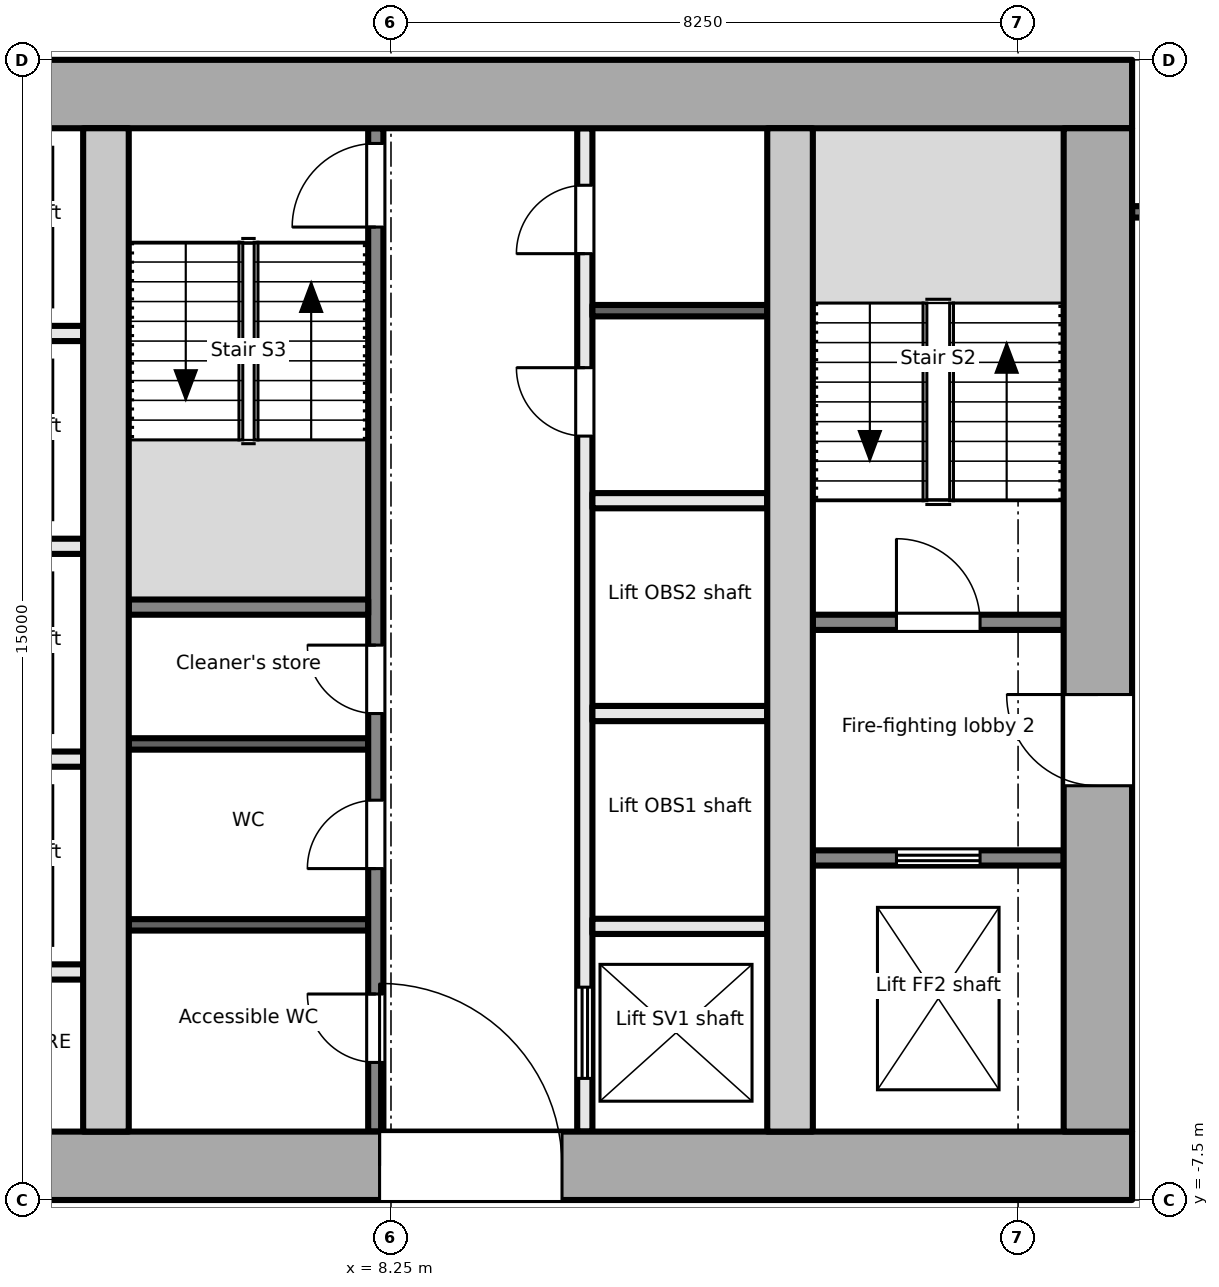
"""IFC4 building model, lengths in metres.
Left out: names, types, materials, properties, quantities, classifications, styles, units other than length and angle.
Written with IfcOpenShell. Run it as: python <this file> out.ifc"""

import sys

from ifc_helpers import new_model, si_unit, direction, frame, frame_2d, origin, place, context, subcontext, project, spatial, rectangle, extrude, element, fill, save


model = new_model("IFC4")
c1 = context("Model", 3, precision=1e-05, world=origin(), true_north=direction((0.0, 1.0)))
c2 = subcontext(c1, "Body", "Model", "MODEL_VIEW")
j1 = project(units=[si_unit("LENGTHUNIT", "METRE"), si_unit("PLANEANGLEUNIT", "RADIAN")], contexts=[c1])
p1 = place(None, origin())
s1 = spatial("IfcSite", under=j1, at=p1, CompositionType="ELEMENT")
p2 = place(p1, origin())
s2 = spatial("IfcBuilding", under=s1, at=p2, CompositionType="ELEMENT")
p3 = place(p2, frame((0.0, 0.0, 282.4)))
s3 = spatial("IfcBuildingStorey", under=s2, at=p3, CompositionType="ELEMENT", Elevation=282.4)
p4 = place(p3, frame((-18.0, -7.05, -0.2), z_axis=(0.0, 0.0, 1.0), x_axis=(1.0, 0.0, 0.0)))
e1 = element("IfcWall", 1, at=p4, inside=s3, PredefinedType="SHEAR", context=c2, shape_type="SweptSolid", body=[
    extrude(rectangle(XDim=36.0, YDim=0.9, at=frame_2d((18.0, 0.0))), origin(), (0.0, 0.0, 1.0), 3.9),
])
p5 = place(p4, frame((8.1, 0.0, 0.2)))
e2 = element("IfcOpeningElement", 2, at=p5, cuts=e1, PredefinedType="OPENING", context=c2, shape_type="SweptSolid", body=[
    extrude(rectangle(XDim=1.8, YDim=2.1, at=frame_2d((0.9, 1.05))), frame((0.0, 0.46, 0.0), z_axis=(0.0, -1.0, 0.0), x_axis=(1.0, 0.0, 0.0)), (0.0, 0.0, 1.0), 0.921),
])
p6 = place(p4, frame((16.8, 0.0, 0.2)))
e3 = element("IfcOpeningElement", 3, at=p6, cuts=e1, PredefinedType="OPENING", context=c2, shape_type="SweptSolid", body=[
    extrude(rectangle(XDim=2.4, YDim=2.1, at=frame_2d((1.2, 1.05))), frame((0.0, 0.46, 0.0), z_axis=(0.0, -1.0, 0.0), x_axis=(1.0, 0.0, 0.0)), (0.0, 0.0, 1.0), 0.921),
])
p7 = place(p4, frame((26.1, 0.0, 0.2)))
e4 = element("IfcOpeningElement", 4, at=p7, cuts=e1, PredefinedType="OPENING", context=c2, shape_type="SweptSolid", body=[
    extrude(rectangle(XDim=2.4, YDim=2.1, at=frame_2d((1.2, 1.05))), frame((0.0, 0.46, 0.0), z_axis=(0.0, -1.0, 0.0), x_axis=(1.0, 0.0, 0.0)), (0.0, 0.0, 1.0), 0.921),
])
p8 = place(p3, frame((-18.0, 7.05, -0.2), z_axis=(0.0, 0.0, 1.0), x_axis=(1.0, 0.0, 0.0)))
e5 = element("IfcWall", 5, at=p8, inside=s3, PredefinedType="SHEAR", context=c2, shape_type="SweptSolid", body=[
    extrude(rectangle(XDim=36.0, YDim=0.9, at=frame_2d((18.0, 0.0))), origin(), (0.0, 0.0, 1.0), 3.9),
])
p9 = place(p3, frame((17.55, -6.6, -0.2), z_axis=(0.0, 0.0, 1.0), x_axis=(0.0, 1.0, 0.0)))
e6 = element("IfcWall", 6, at=p9, inside=s3, PredefinedType="SHEAR", context=c2, shape_type="SweptSolid", body=[
    extrude(rectangle(XDim=13.2, YDim=0.9, at=frame_2d((6.6, 0.0))), origin(), (0.0, 0.0, 1.0), 3.9),
])
p10 = place(p9, frame((4.55, 0.0, 0.2)))
e7 = element("IfcOpeningElement", 7, at=p10, cuts=e6, PredefinedType="OPENING", context=c2, shape_type="SweptSolid", body=[
    extrude(rectangle(XDim=1.2, YDim=2.1, at=frame_2d((0.6, 1.05))), frame((0.0, 0.46, 0.0), z_axis=(0.0, -1.0, 0.0), x_axis=(1.0, 0.0, 0.0)), (0.0, 0.0, 1.0), 0.921),
])
for number, where, z_axis, x_axis in (
    (8, (4.5, -6.6, -0.2), (0.0, 0.0, 1.0), (0.0, 1.0, 0.0)),
    (9, (13.5, -6.6, -0.2), (0.0, 0.0, 1.0), (0.0, 1.0, 0.0)),
):
    element("IfcWall", number, at=place(p3, frame(where, z_axis=z_axis, x_axis=x_axis)), inside=s3, PredefinedType="SHEAR", context=c2, shape_type="SweptSolid", body=[
        extrude(rectangle(XDim=13.2, YDim=0.6, at=frame_2d((6.6, 0.0))), origin(), (0.0, 0.0, 1.0), 3.9),
    ])
p11 = place(p3, frame((13.8, -3.0, 0.0), z_axis=(0.0, 0.0, 1.0), x_axis=(1.0, 0.0, 0.0)))
e10 = element("IfcWall", 10, at=p11, inside=s3, PredefinedType="PARTITIONING", context=c2, shape_type="SweptSolid", body=[
    extrude(rectangle(XDim=3.3, YDim=0.2, at=frame_2d((1.65, 0.0))), origin(), (0.0, 0.0, 1.0), 3.7),
])
p12 = place(p11, frame((1.1, 0.0, 0.0)))
e11 = element("IfcOpeningElement", 11, at=p12, cuts=e10, PredefinedType="OPENING", context=c2, shape_type="SweptSolid", body=[
    extrude(rectangle(XDim=1.1, YDim=2.1, at=frame_2d((0.55, 1.05))), frame((0.0, 0.111, 0.0), z_axis=(0.0, -1.0, 0.0), x_axis=(1.0, 0.0, 0.0)), (0.0, 0.0, 1.0), 0.221),
])
p13 = place(p3, frame((13.8, 0.1, 0.0), z_axis=(0.0, 0.0, 1.0), x_axis=(1.0, 0.0, 0.0)))
e12 = element("IfcWall", 12, at=p13, inside=s3, PredefinedType="PARTITIONING", context=c2, shape_type="SweptSolid", body=[
    extrude(rectangle(XDim=3.3, YDim=0.2, at=frame_2d((1.65, 0.0))), origin(), (0.0, 0.0, 1.0), 3.7),
])
p14 = place(p13, frame((1.1, 0.0, 0.0)))
e13 = element("IfcOpeningElement", 13, at=p14, cuts=e12, PredefinedType="OPENING", context=c2, shape_type="SweptSolid", body=[
    extrude(rectangle(XDim=1.1, YDim=2.1, at=frame_2d((0.55, 1.05))), frame((0.0, 0.111, 0.0), z_axis=(0.0, -1.0, 0.0), x_axis=(1.0, 0.0, 0.0)), (0.0, 0.0, 1.0), 0.221),
])
for number, where, z_axis, x_axis in (
    (14, (1.9, -1.7, 0.0), (0.0, 0.0, 1.0), (1.0, 0.0, 0.0)),
    (15, (1.9, 1.1, 0.0), (0.0, 0.0, 1.0), (1.0, 0.0, 0.0)),
    (16, (1.9, 3.9, 0.0), (0.0, 0.0, 1.0), (1.0, 0.0, 0.0)),
    (17, (1.9, -4.5, 0.0), (0.0, 0.0, 1.0), (1.0, 0.0, 0.0)),
):
    element("IfcWall", number, at=place(p3, frame(where, z_axis=z_axis, x_axis=x_axis)), inside=s3, PredefinedType="PARTITIONING", context=c2, shape_type="SweptSolid", body=[
        extrude(rectangle(XDim=2.3, YDim=0.2, at=frame_2d((1.15, 0.0))), origin(), (0.0, 0.0, 1.0), 3.7),
    ])
p15 = place(p3, frame((8.05, -6.6, 0.0), z_axis=(0.0, 0.0, 1.0), x_axis=(0.0, 1.0, 0.0)))
e18 = element("IfcWall", 18, at=p15, inside=s3, PredefinedType="PARTITIONING", context=c2, shape_type="SweptSolid", body=[
    extrude(rectangle(XDim=13.2, YDim=0.2, at=frame_2d((6.6, 0.0))), origin(), (0.0, 0.0, 1.0), 3.7),
])
p16 = place(p15, frame((0.91, 0.0, 0.0)))
e19 = element("IfcOpeningElement", 19, at=p16, cuts=e18, PredefinedType="OPENING", context=c2, shape_type="SweptSolid", body=[
    extrude(rectangle(XDim=0.9, YDim=2.1, at=frame_2d((0.45, 1.05))), frame((0.0, 0.111, 0.0), z_axis=(0.0, -1.0, 0.0), x_axis=(1.0, 0.0, 0.0)), (0.0, 0.0, 1.0), 0.221),
])
p17 = place(p15, frame((3.46, 0.0, 0.0)))
e20 = element("IfcOpeningElement", 20, at=p17, cuts=e18, PredefinedType="OPENING", context=c2, shape_type="SweptSolid", body=[
    extrude(rectangle(XDim=0.9, YDim=2.1, at=frame_2d((0.45, 1.05))), frame((0.0, 0.111, 0.0), z_axis=(0.0, -1.0, 0.0), x_axis=(1.0, 0.0, 0.0)), (0.0, 0.0, 1.0), 0.221),
])
p18 = place(p15, frame((5.5, 0.0, 0.0)))
e21 = element("IfcOpeningElement", 21, at=p18, cuts=e18, PredefinedType="OPENING", context=c2, shape_type="SweptSolid", body=[
    extrude(rectangle(XDim=0.9, YDim=2.1, at=frame_2d((0.45, 1.05))), frame((0.0, 0.111, 0.0), z_axis=(0.0, -1.0, 0.0), x_axis=(1.0, 0.0, 0.0)), (0.0, 0.0, 1.0), 0.221),
])
p19 = place(p15, frame((11.9, 0.0, 0.0)))
e22 = element("IfcOpeningElement", 22, at=p19, cuts=e18, PredefinedType="OPENING", context=c2, shape_type="SweptSolid", body=[
    extrude(rectangle(XDim=1.1, YDim=2.1, at=frame_2d((0.55, 1.05))), frame((0.0, 0.111, 0.0), z_axis=(0.0, -1.0, 0.0), x_axis=(1.0, 0.0, 0.0)), (0.0, 0.0, 1.0), 0.221),
])
p20 = place(p3, frame((10.8, -6.6, 0.0), z_axis=(0.0, 0.0, 1.0), x_axis=(0.0, 1.0, 0.0)))
e23 = element("IfcWall", 23, at=p20, inside=s3, PredefinedType="PARTITIONING", context=c2, shape_type="SweptSolid", body=[
    extrude(rectangle(XDim=13.2, YDim=0.2, at=frame_2d((6.6, 0.0))), origin(), (0.0, 0.0, 1.0), 3.7),
])
p21 = place(p20, frame((0.7, 0.0, 0.0)))
e24 = element("IfcOpeningElement", 24, at=p21, cuts=e23, PredefinedType="OPENING", context=c2, shape_type="SweptSolid", body=[
    extrude(rectangle(XDim=1.2, YDim=2.1, at=frame_2d((0.6, 1.05))), frame((0.0, 0.111, 0.0), z_axis=(0.0, -1.0, 0.0), x_axis=(1.0, 0.0, 0.0)), (0.0, 0.0, 1.0), 0.221),
])
p22 = place(p20, frame((9.15, 0.0, 0.0)))
e25 = element("IfcOpeningElement", 25, at=p22, cuts=e23, PredefinedType="OPENING", context=c2, shape_type="SweptSolid", body=[
    extrude(rectangle(XDim=0.9, YDim=2.1, at=frame_2d((0.45, 1.05))), frame((0.0, 0.111, 0.0), z_axis=(0.0, -1.0, 0.0), x_axis=(1.0, 0.0, 0.0)), (0.0, 0.0, 1.0), 0.221),
])
p23 = place(p20, frame((11.55, 0.0, 0.0)))
e26 = element("IfcOpeningElement", 26, at=p23, cuts=e23, PredefinedType="OPENING", context=c2, shape_type="SweptSolid", body=[
    extrude(rectangle(XDim=0.9, YDim=2.1, at=frame_2d((0.45, 1.05))), frame((0.0, 0.111, 0.0), z_axis=(0.0, -1.0, 0.0), x_axis=(1.0, 0.0, 0.0)), (0.0, 0.0, 1.0), 0.221),
])
p24 = place(p3, frame((4.8, 0.3, 0.0), z_axis=(0.0, 0.0, 1.0), x_axis=(1.0, 0.0, 0.0)))
e27 = element("IfcWall", 27, at=p24, inside=s3, PredefinedType="PARTITIONING", context=c2, shape_type="SweptSolid", body=[
    extrude(rectangle(XDim=3.15, YDim=0.2, at=frame_2d((1.575, 0.0))), origin(), (0.0, 0.0, 1.0), 3.7),
])
for number, where, z_axis, x_axis in (
    (28, (4.8, -3.88, 0.0), (0.0, 0.0, 1.0), (1.0, 0.0, 0.0)),
    (29, (4.8, -1.5, 0.0), (0.0, 0.0, 1.0), (1.0, 0.0, 0.0)),
):
    element("IfcWall", number, at=place(p3, frame(where, z_axis=z_axis, x_axis=x_axis)), inside=s3, PredefinedType="PARTITIONING", context=c2, shape_type="SweptSolid", body=[
        extrude(rectangle(XDim=3.15, YDim=0.15, at=frame_2d((1.575, 0.0))), origin(), (0.0, 0.0, 1.0), 3.7),
    ])
for number, where, z_axis, x_axis in (
    (30, (10.9, -3.9, 0.0), (0.0, 0.0, 1.0), (1.0, 0.0, 0.0)),
    (31, (10.9, -1.1, 0.0), (0.0, 0.0, 1.0), (1.0, 0.0, 0.0)),
    (32, (10.9, 1.7, 0.0), (0.0, 0.0, 1.0), (1.0, 0.0, 0.0)),
):
    element("IfcWall", number, at=place(p3, frame(where, z_axis=z_axis, x_axis=x_axis)), inside=s3, PredefinedType="PARTITIONING", context=c2, shape_type="SweptSolid", body=[
        extrude(rectangle(XDim=2.3, YDim=0.2, at=frame_2d((1.15, 0.0))), origin(), (0.0, 0.0, 1.0), 3.7),
    ])
p25 = place(p3, frame((10.9, 4.2, 0.0), z_axis=(0.0, 0.0, 1.0), x_axis=(1.0, 0.0, 0.0)))
e33 = element("IfcWall", 33, at=p25, inside=s3, PredefinedType="PARTITIONING", context=c2, shape_type="SweptSolid", body=[
    extrude(rectangle(XDim=2.3, YDim=0.15, at=frame_2d((1.15, 0.0))), origin(), (0.0, 0.0, 1.0), 3.7),
])
p26 = place(p3, frame((18.0, 5.5, 0.0), z_axis=(0.0, 0.0, 1.0), x_axis=(1.0, 0.0, 0.0)))
e34 = element("IfcWall", 34, at=p26, inside=s3, PredefinedType="PARTITIONING", context=c2, shape_type="SweptSolid", body=[
    extrude(rectangle(XDim=2.925, YDim=0.15, at=frame_2d((1.462, 0.0))), origin(), (0.0, 0.0, 1.0), 3.7),
])
p27 = place(p12, origin())
e35 = element("IfcDoor", 35, at=p27, inside=s3, OperationType="DOUBLE_DOOR_SLIDING", PredefinedType="DOOR", context=c2, shape_type="SweptSolid", body=[
    extrude(rectangle(XDim=1.1, YDim=2.1, at=frame_2d((0.55, 1.05))), frame((0.0, 0.025, 0.0), z_axis=(0.0, -1.0, 0.0), x_axis=(1.0, 0.0, 0.0)), (0.0, 0.0, 1.0), 0.05),
])
fill(e11, e35)
p28 = place(p10, origin())
e36 = element("IfcDoor", 36, at=p28, inside=s3, OperationType="SINGLE_SWING_RIGHT", PredefinedType="DOOR", context=c2, shape_type="SweptSolid", body=[
    extrude(rectangle(XDim=1.2, YDim=2.1, at=frame_2d((0.6, 1.05))), frame((0.0, 0.025, 0.0), z_axis=(0.0, -1.0, 0.0), x_axis=(1.0, 0.0, 0.0)), (0.0, 0.0, 1.0), 0.05),
])
fill(e7, e36)
p29 = place(p14, origin())
e37 = element("IfcDoor", 37, at=p29, inside=s3, OperationType="SINGLE_SWING_LEFT", PredefinedType="DOOR", context=c2, shape_type="SweptSolid", body=[
    extrude(rectangle(XDim=1.1, YDim=2.1, at=frame_2d((0.55, 1.05))), frame((0.0, 0.025, 0.0), z_axis=(0.0, -1.0, 0.0), x_axis=(1.0, 0.0, 0.0)), (0.0, 0.0, 1.0), 0.05),
])
fill(e13, e37)
p30 = place(p16, origin())
e38 = element("IfcDoor", 38, at=p30, inside=s3, OperationType="SINGLE_SWING_RIGHT", PredefinedType="DOOR", context=c2, shape_type="SweptSolid", body=[
    extrude(rectangle(XDim=0.9, YDim=2.1, at=frame_2d((0.45, 1.05))), frame((0.0, 0.025, 0.0), z_axis=(0.0, -1.0, 0.0), x_axis=(1.0, 0.0, 0.0)), (0.0, 0.0, 1.0), 0.05),
])
fill(e19, e38)
p31 = place(p17, origin())
e39 = element("IfcDoor", 39, at=p31, inside=s3, OperationType="SINGLE_SWING_LEFT", PredefinedType="DOOR", context=c2, shape_type="SweptSolid", body=[
    extrude(rectangle(XDim=0.9, YDim=2.1, at=frame_2d((0.45, 1.05))), frame((0.0, 0.025, 0.0), z_axis=(0.0, -1.0, 0.0), x_axis=(1.0, 0.0, 0.0)), (0.0, 0.0, 1.0), 0.05),
])
fill(e20, e39)
p32 = place(p18, origin())
e40 = element("IfcDoor", 40, at=p32, inside=s3, OperationType="SINGLE_SWING_RIGHT", PredefinedType="DOOR", context=c2, shape_type="SweptSolid", body=[
    extrude(rectangle(XDim=0.9, YDim=2.1, at=frame_2d((0.45, 1.05))), frame((0.0, 0.025, 0.0), z_axis=(0.0, -1.0, 0.0), x_axis=(1.0, 0.0, 0.0)), (0.0, 0.0, 1.0), 0.05),
])
fill(e21, e40)
p33 = place(p19, origin())
e41 = element("IfcDoor", 41, at=p33, inside=s3, OperationType="SINGLE_SWING_LEFT", PredefinedType="DOOR", context=c2, shape_type="SweptSolid", body=[
    extrude(rectangle(XDim=1.1, YDim=2.1, at=frame_2d((0.55, 1.05))), frame((0.0, 0.025, 0.0), z_axis=(0.0, -1.0, 0.0), x_axis=(1.0, 0.0, 0.0)), (0.0, 0.0, 1.0), 0.05),
])
fill(e22, e41)
p34 = place(p7, origin())
e42 = element("IfcDoor", 42, at=p34, inside=s3, OperationType="DOUBLE_DOOR_DOUBLE_SWING", PredefinedType="DOOR", context=c2, shape_type="SweptSolid", body=[
    extrude(rectangle(XDim=2.4, YDim=2.1, at=frame_2d((1.2, 1.05))), frame((0.0, 0.025, 0.0), z_axis=(0.0, -1.0, 0.0), x_axis=(1.0, 0.0, 0.0)), (0.0, 0.0, 1.0), 0.05),
])
fill(e4, e42)
p35 = place(p21, origin())
e43 = element("IfcDoor", 43, at=p35, inside=s3, OperationType="DOUBLE_DOOR_SLIDING", PredefinedType="DOOR", context=c2, shape_type="SweptSolid", body=[
    extrude(rectangle(XDim=1.2, YDim=2.1, at=frame_2d((0.6, 1.05))), frame((0.0, 0.025, 0.0), z_axis=(0.0, -1.0, 0.0), x_axis=(1.0, 0.0, 0.0)), (0.0, 0.0, 1.0), 0.05),
])
fill(e24, e43)
p36 = place(p22, origin())
e44 = element("IfcDoor", 44, at=p36, inside=s3, OperationType="SINGLE_SWING_RIGHT", PredefinedType="DOOR", context=c2, shape_type="SweptSolid", body=[
    extrude(rectangle(XDim=0.9, YDim=2.1, at=frame_2d((0.45, 1.05))), frame((0.0, 0.025, 0.0), z_axis=(0.0, -1.0, 0.0), x_axis=(1.0, 0.0, 0.0)), (0.0, 0.0, 1.0), 0.05),
])
fill(e25, e44)
p37 = place(p23, origin())
e45 = element("IfcDoor", 45, at=p37, inside=s3, OperationType="SINGLE_SWING_LEFT", PredefinedType="DOOR", context=c2, shape_type="SweptSolid", body=[
    extrude(rectangle(XDim=0.9, YDim=2.1, at=frame_2d((0.45, 1.05))), frame((0.0, 0.025, 0.0), z_axis=(0.0, -1.0, 0.0), x_axis=(1.0, 0.0, 0.0)), (0.0, 0.0, 1.0), 0.05),
])
fill(e26, e45)
save(model, sys.argv[1])
